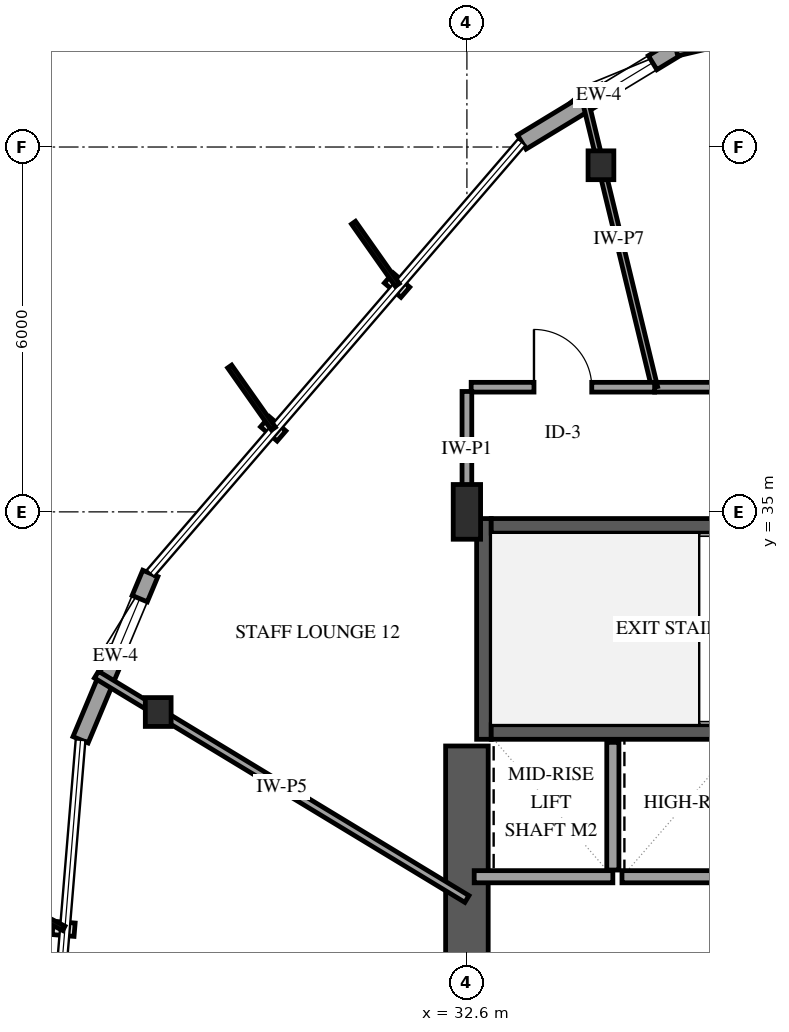
"""IFC4 building model, lengths in metres.
Left out: names, types, materials, properties, quantities, classifications, styles, units other than length and angle.
Written with IfcOpenShell. Run it as: python <this file> out.ifc"""

import sys

from ifc_helpers import new_model, si_unit, direction, frame, frame_2d, origin, origin_2d, place, context, subcontext, project, spatial, rectangle, i_section, extrude, element, fill, save


model = new_model("IFC4")
c1 = context("Model", 3, precision=1e-05, world=origin(), true_north=direction((0.0, 1.0)))
c2 = subcontext(c1, "Body", "Model", "MODEL_VIEW")
j1 = project(units=[si_unit("LENGTHUNIT", "METRE"), si_unit("PLANEANGLEUNIT", "RADIAN")], contexts=[c1])
p1 = place(None, origin())
s1 = spatial("IfcSite", under=j1, at=p1, CompositionType="ELEMENT")
p2 = place(p1, origin())
s2 = spatial("IfcBuilding", under=s1, at=p2, CompositionType="ELEMENT")
p3 = place(p2, frame((0.0, 0.0, 78.6)))
s3 = spatial("IfcBuildingStorey", under=s2, at=p3, CompositionType="ELEMENT", Elevation=78.6)
p4 = place(p3, frame((32.88, 31.26, 0.0), z_axis=(0.0, 0.0, 1.0), x_axis=(0.0, 1.0, 0.0)))
e1 = element("IfcWall", 1, at=p4, inside=s3, PredefinedType="SHEAR", context=c2, shape_type="SweptSolid", body=[
    extrude(rectangle(XDim=3.63, YDim=0.24, at=frame_2d((1.815, 0.0))), origin(), (0.0, 0.0, 1.0), 4.0),
])
for number, where, z_axis, x_axis in (
    (2, (33.0, 31.38, 0.0), (0.0, 0.0, 1.0), (1.0, 0.0, 0.0)),
    (3, (33.0, 34.77, 0.0), (0.0, 0.0, 1.0), (1.0, 0.0, 0.0)),
):
    element("IfcWall", number, at=place(p3, frame(where, z_axis=z_axis, x_axis=x_axis)), inside=s3, PredefinedType="SHEAR", context=c2, shape_type="SweptSolid", body=[
        extrude(rectangle(XDim=8.0, YDim=0.24, at=frame_2d((4.0, 0.0))), origin(), (0.0, 0.0, 1.0), 4.0),
    ])
p5 = place(p3, frame((32.6, 18.85, 0.0), z_axis=(0.0, 0.0, 1.0), x_axis=(0.0, 1.0, 0.0)))
e4 = element("IfcWall", 4, at=p5, inside=s3, PredefinedType="SHEAR", context=c2, shape_type="SweptSolid", body=[
    extrude(rectangle(XDim=12.3, YDim=0.7, at=frame_2d((6.15, 0.0))), origin(), (0.0, 0.0, 1.0), 4.0),
])
p6 = place(p3, frame((32.6, 35.0, 0.0), z_axis=(0.0, 0.0, 1.0), x_axis=(1.0, 0.0, 0.0)))
e5 = element("IfcColumn", 5, at=p6, inside=s3, PredefinedType="PILASTER", context=c2, shape_type="SweptSolid", body=[
    extrude(rectangle(XDim=0.45, YDim=0.9, at=origin_2d()), origin(), (0.0, 0.0, 1.0), 4.0),
])
for number, where, z_axis, x_axis in (
    (6, (34.804, 40.7, 0.0), (0.0, 0.0, 1.0), (1.0, 0.0, 0.0)),
    (7, (27.523, 31.708, 0.0), (0.0, 0.0, 1.0), (1.0, 0.0, 0.0)),
):
    element("IfcColumn", number, at=place(p3, frame(where, z_axis=z_axis, x_axis=x_axis)), inside=s3, PredefinedType="COLUMN", context=c2, shape_type="SweptSolid", body=[
        extrude(i_section(OverallWidth=0.424, OverallDepth=0.474, WebThickness=0.048, FlangeThickness=0.077, FilletRadius=0.038, at=origin_2d()), origin(), (0.0, 0.0, 1.0), 4.0),
    ])
p7 = place(p3, frame((36.039, 42.62, 0.0), z_axis=(0.0, 0.0, 1.0), x_axis=(-0.854838363076, -0.518894375584, 0.0)))
e8 = element("IfcWall", 8, at=p7, inside=s3, PredefinedType="SOLIDWALL", context=c2, shape_type="SweptSolid", body=[
    extrude(rectangle(XDim=2.967, YDim=0.27, at=frame_2d((1.483, 0.0))), origin(), (0.0, 0.0, 1.0), 3.039),
])
p8 = place(p7, frame((0.45, 0.0, 0.75)))
e9 = element("IfcOpeningElement", 9, at=p8, cuts=e8, PredefinedType="OPENING", context=c2, shape_type="SweptSolid", body=[
    extrude(rectangle(XDim=0.9, YDim=1.5, at=frame_2d((0.45, 0.75))), frame((0.0, 0.145, 0.0), z_axis=(0.0, -1.0, 0.0), x_axis=(1.0, 0.0, 0.0)), (0.0, 0.0, 1.0), 0.29),
])
p9 = place(p3, frame((45.151, 44.767, 0.0), z_axis=(0.0, 0.0, 1.0), x_axis=(-0.973339472423, -0.229369290498, 0.0)))
e10 = element("IfcWall", 10, at=p9, inside=s3, PredefinedType="SOLIDWALL", context=c2, shape_type="SweptSolid", body=[
    extrude(rectangle(XDim=9.361, YDim=0.25, at=frame_2d((4.681, 0.0))), origin(), (0.0, 0.0, 1.0), 3.039),
])
p10 = place(p9, frame((4.181, 0.0, 0.0)))
e11 = element("IfcOpeningElement", 11, at=p10, cuts=e10, PredefinedType="OPENING", context=c2, shape_type="SweptSolid", body=[
    extrude(rectangle(XDim=1.05, YDim=2.15, at=frame_2d((0.525, 1.075))), frame((0.0, 0.135, 0.0), z_axis=(0.0, -1.0, 0.0), x_axis=(1.0, 0.0, 0.0)), (0.0, 0.0, 1.0), 0.27),
])
p11 = place(p9, frame((0.44, 0.0, 0.72)))
e12 = element("IfcOpeningElement", 12, at=p11, cuts=e10, PredefinedType="OPENING", context=c2, shape_type="SweptSolid", body=[
    extrude(rectangle(XDim=0.9, YDim=1.5, at=frame_2d((0.45, 0.75))), frame((0.0, 0.135, 0.0), z_axis=(0.0, -1.0, 0.0), x_axis=(1.0, 0.0, 0.0)), (0.0, 0.0, 1.0), 0.27),
])
p12 = place(p9, frame((5.871, 0.0, 0.72)))
e13 = element("IfcOpeningElement", 13, at=p12, cuts=e10, PredefinedType="OPENING", context=c2, shape_type="SweptSolid", body=[
    extrude(rectangle(XDim=0.9, YDim=1.5, at=frame_2d((0.45, 0.75))), frame((0.0, 0.135, 0.0), z_axis=(0.0, -1.0, 0.0), x_axis=(1.0, 0.0, 0.0)), (0.0, 0.0, 1.0), 0.27),
])
p13 = place(p3, frame((27.393, 33.988, 0.0), z_axis=(0.0, 0.0, 1.0), x_axis=(-0.386537026706, -0.922273889354, 0.0)))
e14 = element("IfcWall", 14, at=p13, inside=s3, PredefinedType="SOLIDWALL", context=c2, shape_type="SweptSolid", body=[
    extrude(rectangle(XDim=2.967, YDim=0.27, at=frame_2d((1.483, 0.0))), origin(), (0.0, 0.0, 1.0), 3.039),
])
p14 = place(p13, frame((0.45, 0.0, 0.75)))
e15 = element("IfcOpeningElement", 15, at=p14, cuts=e14, PredefinedType="OPENING", context=c2, shape_type="SweptSolid", body=[
    extrude(rectangle(XDim=0.9, YDim=1.5, at=frame_2d((0.45, 0.75))), frame((0.0, 0.145, 0.0), z_axis=(0.0, -1.0, 0.0), x_axis=(1.0, 0.0, 0.0)), (0.0, 0.0, 1.0), 0.29),
])
p15 = place(p3, frame((32.72, 29.0, 0.0), z_axis=(0.0, 0.0, 1.0), x_axis=(1.0, 0.0, 0.0)))
e16 = element("IfcWall", 16, at=p15, inside=s3, PredefinedType="SOLIDWALL", context=c2, shape_type="SweptSolid", body=[
    extrude(rectangle(XDim=2.28, YDim=0.2, at=frame_2d((1.14, 0.0))), origin(), (0.0, 0.0, 1.0), 3.66),
])
p16 = place(p3, frame((35.0, 29.11, 0.0), z_axis=(0.0, 0.0, 1.0), x_axis=(0.0, 1.0, 0.0)))
e17 = element("IfcWall", 17, at=p16, inside=s3, PredefinedType="SOLIDWALL", context=c2, shape_type="SweptSolid", body=[
    extrude(rectangle(XDim=2.1, YDim=0.2, at=frame_2d((1.05, 0.0))), origin(), (0.0, 0.0, 1.0), 3.66),
])
p17 = place(p3, frame((35.15, 29.0, 0.0), z_axis=(0.0, 0.0, 1.0), x_axis=(1.0, 0.0, 0.0)))
e18 = element("IfcWall", 18, at=p17, inside=s3, PredefinedType="SOLIDWALL", context=c2, shape_type="SweptSolid", body=[
    extrude(rectangle(XDim=2.0, YDim=0.2, at=frame_2d((1.0, 0.0))), origin(), (0.0, 0.0, 1.0), 3.66),
])
p18 = place(p3, frame((35.687, 37.05, 0.0), z_axis=(0.0, 0.0, 1.0), x_axis=(1.0, 0.0, 0.0)))
e19 = element("IfcWall", 19, at=p18, inside=s3, PredefinedType="PARTITIONING", context=c2, shape_type="SweptSolid", body=[
    extrude(rectangle(XDim=7.67, YDim=0.16, at=frame_2d((3.835, 0.0))), origin(), (0.0, 0.0, 1.0), 3.66),
])
p19 = place(p18, frame((3.36, 0.0, 0.0)))
e20 = element("IfcOpeningElement", 20, at=p19, cuts=e19, PredefinedType="OPENING", context=c2, shape_type="SweptSolid", body=[
    extrude(rectangle(XDim=0.95, YDim=2.15, at=frame_2d((0.475, 1.075))), frame((0.0, 0.09, 0.0), z_axis=(0.0, -1.0, 0.0), x_axis=(1.0, 0.0, 0.0)), (0.0, 0.0, 1.0), 0.18),
])
p20 = place(p3, frame((32.6, 28.634, 0.0), z_axis=(0.0, 0.0, 1.0), x_axis=(-0.855395761356, 0.517974991147, 0.0)))
e21 = element("IfcWall", 21, at=p20, inside=s3, PredefinedType="PARTITIONING", context=c2, shape_type="SweptSolid", body=[
    extrude(rectangle(XDim=7.122, YDim=0.13, at=frame_2d((3.561, 0.0))), origin(), (0.0, 0.0, 1.0), 3.66),
])
p21 = place(p3, frame((35.687, 37.05, 0.0), z_axis=(0.0, 0.0, 1.0), x_axis=(-0.235161687333, 0.971956264865, 0.0)))
e22 = element("IfcWall", 22, at=p21, inside=s3, PredefinedType="PARTITIONING", context=c2, shape_type="SweptSolid", body=[
    extrude(rectangle(XDim=5.022, YDim=0.1, at=frame_2d((2.511, 0.0))), origin(), (0.0, 0.0, 1.0), 2.955),
])
p22 = place(p3, frame((32.67, 37.05, 0.0), z_axis=(0.0, 0.0, 1.0), x_axis=(1.0, 0.0, 0.0)))
e23 = element("IfcWall", 23, at=p22, inside=s3, PredefinedType="PARTITIONING", context=c2, shape_type="SweptSolid", body=[
    extrude(rectangle(XDim=3.017, YDim=0.16, at=frame_2d((1.509, 0.0))), origin(), (0.0, 0.0, 1.0), 3.66),
])
p23 = place(p22, frame((1.033, 0.0, 0.0)))
e24 = element("IfcOpeningElement", 24, at=p23, cuts=e23, PredefinedType="OPENING", context=c2, shape_type="SweptSolid", body=[
    extrude(rectangle(XDim=0.95, YDim=2.15, at=frame_2d((0.475, 1.075))), frame((0.0, 0.09, 0.0), z_axis=(0.0, -1.0, 0.0), x_axis=(1.0, 0.0, 0.0)), (0.0, 0.0, 1.0), 0.18),
])
p24 = place(p3, frame((32.6, 35.07, 0.0), z_axis=(0.0, 0.0, 1.0), x_axis=(0.0, 1.0, 0.0)))
e25 = element("IfcWall", 25, at=p24, inside=s3, PredefinedType="PARTITIONING", context=c2, shape_type="SweptSolid", body=[
    extrude(rectangle(XDim=1.91, YDim=0.16, at=frame_2d((0.955, 0.0))), origin(), (0.0, 0.0, 1.0), 3.66),
])
p25 = place(p8, origin())
e26 = element("IfcWindow", 26, at=p25, inside=s3, PartitioningType="SINGLE_PANEL", PredefinedType="WINDOW", context=c2, shape_type="SweptSolid", body=[
    extrude(rectangle(XDim=0.9, YDim=1.5, at=frame_2d((0.45, 0.75))), frame((0.0, 0.03, 0.0), z_axis=(0.0, -1.0, 0.0), x_axis=(1.0, 0.0, 0.0)), (0.0, 0.0, 1.0), 0.06),
])
fill(e9, e26)
p26 = place(p14, origin())
e27 = element("IfcWindow", 27, at=p26, inside=s3, PartitioningType="SINGLE_PANEL", PredefinedType="WINDOW", context=c2, shape_type="SweptSolid", body=[
    extrude(rectangle(XDim=0.9, YDim=1.5, at=frame_2d((0.45, 0.75))), frame((0.0, 0.03, 0.0), z_axis=(0.0, -1.0, 0.0), x_axis=(1.0, 0.0, 0.0)), (0.0, 0.0, 1.0), 0.06),
])
fill(e15, e27)
p27 = place(p23, origin())
e28 = element("IfcDoor", 28, at=p27, inside=s3, OperationType="SINGLE_SWING_LEFT", PredefinedType="DOOR", context=c2, shape_type="SweptSolid", body=[
    extrude(rectangle(XDim=0.95, YDim=2.15, at=frame_2d((0.475, 1.075))), frame((0.0, 0.025, 0.0), z_axis=(0.0, -1.0, 0.0), x_axis=(1.0, 0.0, 0.0)), (0.0, 0.0, 1.0), 0.05),
])
fill(e24, e28)
save(model, sys.argv[1])
